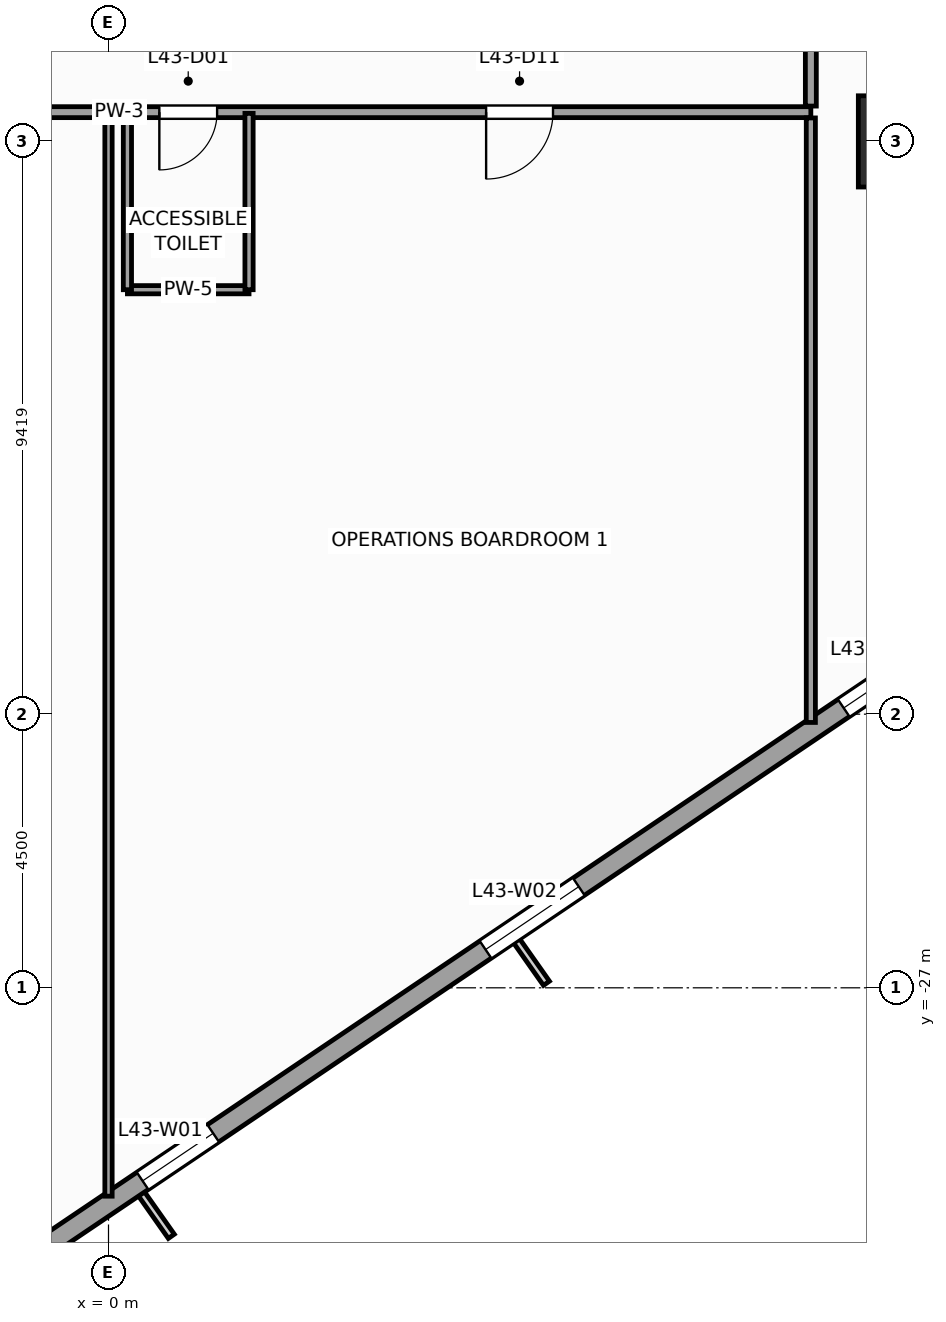
"""IFC4 building model, lengths in metres.
Left out: names, types, materials, properties, quantities, classifications, styles, units other than length and angle.
Written with IfcOpenShell. Run it as: python <this file> out.ifc"""

import sys

from ifc_helpers import new_model, si_unit, direction, frame, frame_2d, origin, origin_2d, place, context, subcontext, project, spatial, rectangle, extrude, source, transform, mapped, element, fill, save


model = new_model("IFC4")
c1 = context("Model", 3, precision=1e-05, world=origin(), true_north=direction((0.0, 1.0)))
c2 = subcontext(c1, "Body", "Model", "MODEL_VIEW")
j1 = project(units=[si_unit("LENGTHUNIT", "METRE"), si_unit("PLANEANGLEUNIT", "RADIAN")], contexts=[c1])
p1 = place(None, origin())
s1 = spatial("IfcSite", under=j1, at=p1, CompositionType="ELEMENT")
p2 = place(p1, origin())
s2 = spatial("IfcBuilding", under=s1, at=p2, CompositionType="ELEMENT")
p3 = place(p2, frame((0.0, 0.0, 180.4)))
s3 = spatial("IfcBuildingStorey", under=s2, at=p3, CompositionType="ELEMENT", Elevation=180.4)
m1 = source(origin(), c2, "Body", "SweptSolid", [
    extrude(rectangle(XDim=1.5, YDim=1.5, at=origin_2d()), origin(), (0.0, 0.0, 1.0), 4.0),
])
p4 = place(p3, frame((13.081, -13.081, 0.0), z_axis=(0.0, 0.0, 1.0), x_axis=(1.0, 0.0, 0.0)))
e1 = element("IfcColumn", 1, at=p4, inside=s3, PredefinedType="COLUMN", context=c2, shape_type="MappedRepresentation", body=[
    mapped(m1, transform((0.0, 0.0, 0.0), scale=1.0)),
])
p5 = place(p3, frame((-2.972, -32.558, 0.0), z_axis=(0.0, 0.0, 1.0), x_axis=(0.829036218961, 0.559194910251, 0.0)))
e2 = element("IfcWall", 2, at=p5, inside=s3, PredefinedType="STANDARD", context=c2, shape_type="SweptSolid", body=[
    extrude(rectangle(XDim=41.34, YDim=0.34, at=frame_2d((20.67, 0.0))), origin(), (0.0, 0.0, 1.0), 3.04),
])
p6 = place(p5, frame((4.261, 0.0, 0.56)))
e3 = element("IfcOpeningElement", 3, at=p6, cuts=e2, PredefinedType="OPENING", context=c2, shape_type="SweptSolid", body=[
    extrude(rectangle(XDim=1.4, YDim=2.4, at=frame_2d((0.7, 1.2))), frame((0.0, 0.18, 0.0), z_axis=(0.0, -1.0, 0.0), x_axis=(1.0, 0.0, 0.0)), (0.0, 0.0, 1.0), 0.36),
])
p7 = place(p5, frame((11.064, 0.0, 0.61)))
e4 = element("IfcOpeningElement", 4, at=p7, cuts=e2, PredefinedType="OPENING", context=c2, shape_type="SweptSolid", body=[
    extrude(rectangle(XDim=1.85, YDim=2.35, at=frame_2d((0.925, 1.175))), frame((0.0, 0.18, 0.0), z_axis=(0.0, -1.0, 0.0), x_axis=(1.0, 0.0, 0.0)), (0.0, 0.0, 1.0), 0.36),
])
p8 = place(p5, frame((18.168, 0.0, 0.61)))
e5 = element("IfcOpeningElement", 5, at=p8, cuts=e2, PredefinedType="OPENING", context=c2, shape_type="SweptSolid", body=[
    extrude(rectangle(XDim=1.85, YDim=2.35, at=frame_2d((0.925, 1.175))), frame((0.0, 0.18, 0.0), z_axis=(0.0, -1.0, 0.0), x_axis=(1.0, 0.0, 0.0)), (0.0, 0.0, 1.0), 0.36),
])
p9 = place(p5, frame((27.186, 0.0, 0.61)))
e6 = element("IfcOpeningElement", 6, at=p9, cuts=e2, PredefinedType="OPENING", context=c2, shape_type="SweptSolid", body=[
    extrude(rectangle(XDim=1.85, YDim=2.35, at=frame_2d((0.925, 1.175))), frame((0.0, 0.18, 0.0), z_axis=(0.0, -1.0, 0.0), x_axis=(1.0, 0.0, 0.0)), (0.0, 0.0, 1.0), 0.36),
])
p10 = place(p5, frame((34.852, 0.0, 0.56)))
e7 = element("IfcOpeningElement", 7, at=p10, cuts=e2, PredefinedType="OPENING", context=c2, shape_type="SweptSolid", body=[
    extrude(rectangle(XDim=1.4, YDim=2.4, at=frame_2d((0.7, 1.2))), frame((0.0, 0.18, 0.0), z_axis=(0.0, -1.0, 0.0), x_axis=(1.0, 0.0, 0.0)), (0.0, 0.0, 1.0), 0.36),
])
p11 = place(p3, frame((-10.45, -12.6, 0.0), z_axis=(0.0, 0.0, 1.0), x_axis=(1.0, 0.0, 0.0)))
e8 = element("IfcWall", 8, at=p11, inside=s3, PredefinedType="PARTITIONING", context=c2, shape_type="SweptSolid", body=[
    extrude(rectangle(XDim=22.0, YDim=0.18, at=frame_2d((11.0, 0.0))), origin(), (0.0, 0.0, 1.0), 3.74),
])
p12 = place(p11, frame((11.286, 0.0, 0.0)))
e9 = element("IfcOpeningElement", 9, at=p12, cuts=e8, PredefinedType="OPENING", context=c2, shape_type="SweptSolid", body=[
    extrude(rectangle(XDim=0.95, YDim=2.1, at=frame_2d((0.475, 1.05))), frame((0.0, 0.1, 0.0), z_axis=(0.0, -1.0, 0.0), x_axis=(1.0, 0.0, 0.0)), (0.0, 0.0, 1.0), 0.2),
])
p13 = place(p11, frame((4.839, 0.0, 0.0)))
e10 = element("IfcOpeningElement", 10, at=p13, cuts=e8, PredefinedType="OPENING", context=c2, shape_type="SweptSolid", body=[
    extrude(rectangle(XDim=1.1, YDim=2.2, at=frame_2d((0.55, 1.1))), frame((0.0, 0.1, 0.0), z_axis=(0.0, -1.0, 0.0), x_axis=(1.0, 0.0, 0.0)), (0.0, 0.0, 1.0), 0.2),
])
p14 = place(p11, frame((16.66, 0.0, 0.0)))
e11 = element("IfcOpeningElement", 11, at=p14, cuts=e8, PredefinedType="OPENING", context=c2, shape_type="SweptSolid", body=[
    extrude(rectangle(XDim=1.1, YDim=2.2, at=frame_2d((0.55, 1.1))), frame((0.0, 0.1, 0.0), z_axis=(0.0, -1.0, 0.0), x_axis=(1.0, 0.0, 0.0)), (0.0, 0.0, 1.0), 0.2),
])
p15 = place(p3, frame((11.55, -12.5, 0.0), z_axis=(0.0, 0.0, 1.0), x_axis=(0.0, 1.0, 0.0)))
e12 = element("IfcWall", 12, at=p15, inside=s3, PredefinedType="PARTITIONING", context=c2, shape_type="SweptSolid", body=[
    extrude(rectangle(XDim=14.1, YDim=0.18, at=frame_2d((7.05, 0.0))), origin(), (0.0, 0.0, 1.0), 3.74),
])
p16 = place(p15, frame((9.539, 0.0, 0.0)))
e13 = element("IfcOpeningElement", 13, at=p16, cuts=e12, PredefinedType="OPENING", context=c2, shape_type="SweptSolid", body=[
    extrude(rectangle(XDim=0.95, YDim=2.1, at=frame_2d((0.475, 1.05))), frame((0.0, 0.1, 0.0), z_axis=(0.0, -1.0, 0.0), x_axis=(1.0, 0.0, 0.0)), (0.0, 0.0, 1.0), 0.2),
])
p17 = place(p15, frame((12.061, 0.0, 0.0)))
e14 = element("IfcOpeningElement", 14, at=p17, cuts=e12, PredefinedType="OPENING", context=c2, shape_type="SweptSolid", body=[
    extrude(rectangle(XDim=1.1, YDim=2.2, at=frame_2d((0.55, 1.1))), frame((0.0, 0.1, 0.0), z_axis=(0.0, -1.0, 0.0), x_axis=(1.0, 0.0, 0.0)), (0.0, 0.0, 1.0), 0.2),
])
p18 = place(p15, frame((4.065, 0.0, 0.0)))
e15 = element("IfcOpeningElement", 15, at=p18, cuts=e12, PredefinedType="OPENING", context=c2, shape_type="SweptSolid", body=[
    extrude(rectangle(XDim=1.1, YDim=2.2, at=frame_2d((0.55, 1.1))), frame((0.0, 0.1, 0.0), z_axis=(0.0, -1.0, 0.0), x_axis=(1.0, 0.0, 0.0)), (0.0, 0.0, 1.0), 0.2),
])
p19 = place(p3, frame((0.0, -30.427, 0.0), z_axis=(0.0, 0.0, 1.0), x_axis=(0.0, 1.0, 0.0)))
e16 = element("IfcWall", 16, at=p19, inside=s3, PredefinedType="PARTITIONING", context=c2, shape_type="SweptSolid", body=[
    extrude(rectangle(XDim=17.732, YDim=0.12, at=frame_2d((8.866, 0.0))), origin(), (0.0, 0.0, 1.0), 3.74),
])
p20 = place(p3, frame((11.55, -22.636, 0.0), z_axis=(0.0, 0.0, 1.0), x_axis=(0.0, 1.0, 0.0)))
e17 = element("IfcWall", 17, at=p20, inside=s3, PredefinedType="PARTITIONING", context=c2, shape_type="SweptSolid", body=[
    extrude(rectangle(XDim=9.941, YDim=0.15, at=frame_2d((4.971, 0.0))), origin(), (0.0, 0.0, 1.0), 3.74),
])
p21 = place(p3, frame((0.311, -15.52, 0.0), z_axis=(0.0, 0.0, 1.0), x_axis=(1.0, 0.0, 0.0)))
e18 = element("IfcWall", 18, at=p21, inside=s3, PredefinedType="PARTITIONING", context=c2, shape_type="SweptSolid", body=[
    extrude(rectangle(XDim=2.0, YDim=0.135, at=frame_2d((1.0, 0.0))), origin(), (0.0, 0.0, 1.0), 3.74),
])
for number, where, z_axis, x_axis in (
    (19, (2.311, -15.52, 0.0), (0.0, 0.0, 1.0), (0.0, 1.0, 0.0)),
    (20, (0.311, -15.52, 0.0), (0.0, 0.0, 1.0), (0.0, 1.0, 0.0)),
):
    element("IfcWall", number, at=place(p3, frame(where, z_axis=z_axis, x_axis=x_axis)), inside=s3, PredefinedType="PARTITIONING", context=c2, shape_type="SweptSolid", body=[
        extrude(rectangle(XDim=2.9, YDim=0.135, at=frame_2d((1.45, 0.0))), origin(), (0.0, 0.0, 1.0), 3.74),
    ])
m2 = source(origin(), c2, "Body", "SweptSolid", [
    extrude(rectangle(XDim=1.4, YDim=2.4, at=frame_2d((0.7, 1.2))), frame((0.0, 0.03, 0.0), z_axis=(0.0, -1.0, 0.0), x_axis=(1.0, 0.0, 0.0)), (0.0, 0.0, 1.0), 0.06),
])
p22 = place(p6, origin())
e21 = element("IfcWindow", 21, at=p22, inside=s3, PartitioningType="SINGLE_PANEL", PredefinedType="WINDOW", context=c2, shape_type="MappedRepresentation", body=[
    mapped(m2, transform((0.0, 0.0, 0.0), scale=1.0)),
])
fill(e3, e21)
m3 = source(origin(), c2, "Body", "SweptSolid", [
    extrude(rectangle(XDim=1.85, YDim=2.35, at=frame_2d((0.925, 1.175))), frame((0.0, 0.03, 0.0), z_axis=(0.0, -1.0, 0.0), x_axis=(1.0, 0.0, 0.0)), (0.0, 0.0, 1.0), 0.06),
])
p23 = place(p7, origin())
e22 = element("IfcWindow", 22, at=p23, inside=s3, PartitioningType="SINGLE_PANEL", PredefinedType="WINDOW", context=c2, shape_type="MappedRepresentation", body=[
    mapped(m3, transform((0.0, 0.0, 0.0), scale=1.0)),
])
fill(e4, e22)
p24 = place(p8, origin())
e23 = element("IfcWindow", 23, at=p24, inside=s3, PartitioningType="SINGLE_PANEL", PredefinedType="WINDOW", context=c2, shape_type="MappedRepresentation", body=[
    mapped(m3, transform((0.0, 0.0, 0.0), scale=1.0)),
])
fill(e5, e23)
m4 = source(origin(), c2, "Body", "SweptSolid", [
    extrude(rectangle(XDim=0.95, YDim=2.1, at=frame_2d((0.475, 1.05))), frame((0.0, 0.025, 0.0), z_axis=(0.0, -1.0, 0.0), x_axis=(1.0, 0.0, 0.0)), (0.0, 0.0, 1.0), 0.05),
])
p25 = place(p12, frame((0.95, 0.0, 0.0), z_axis=(0.0, 0.0, 1.0), x_axis=(-1.0, 0.0, 0.0)))
e24 = element("IfcDoor", 24, at=p25, inside=s3, OperationType="SINGLE_SWING_LEFT", PredefinedType="DOOR", context=c2, shape_type="MappedRepresentation", body=[
    mapped(m4, transform((0.0, 0.0, 0.0), scale=1.0)),
])
fill(e9, e24)
m5 = source(origin(), c2, "Body", "SweptSolid", [
    extrude(rectangle(XDim=1.1, YDim=2.2, at=frame_2d((0.55, 1.1))), frame((0.0, 0.025, 0.0), z_axis=(0.0, -1.0, 0.0), x_axis=(1.0, 0.0, 0.0)), (0.0, 0.0, 1.0), 0.05),
])
p26 = place(p14, frame((1.1, 0.0, 0.0), z_axis=(0.0, 0.0, 1.0), x_axis=(-1.0, 0.0, 0.0)))
e25 = element("IfcDoor", 25, at=p26, inside=s3, OperationType="SINGLE_SWING_LEFT", PredefinedType="DOOR", context=c2, shape_type="MappedRepresentation", body=[
    mapped(m5, transform((0.0, 0.0, 0.0), scale=1.0)),
])
fill(e11, e25)
save(model, sys.argv[1])
